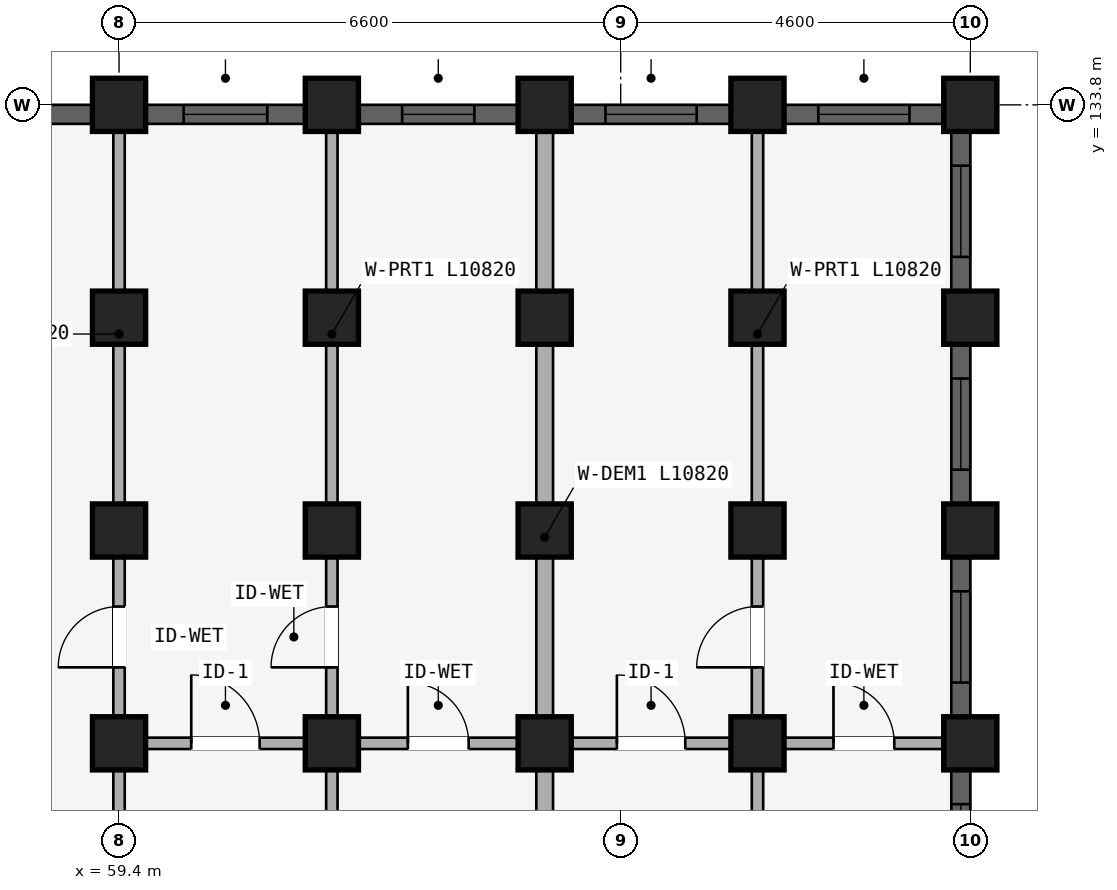
"""IFC4 building model, lengths in metres.
Left out: names, types, materials, properties, quantities, classifications, styles, units other than length and angle.
Written with IfcOpenShell. Run it as: python <this file> out.ifc"""

import sys

from ifc_helpers import new_model, si_unit, direction, frame, frame_2d, origin, origin_2d, place, context, subcontext, project, spatial, rectangle, extrude, element, fill, save


model = new_model("IFC4")
c1 = context("Model", 3, precision=1e-05, world=origin(), true_north=direction((0.0, 1.0)))
c2 = subcontext(c1, "Body", "Model", "MODEL_VIEW")
j1 = project(units=[si_unit("LENGTHUNIT", "METRE"), si_unit("PLANEANGLEUNIT", "RADIAN")], contexts=[c1])
p1 = place(None, origin())
s1 = spatial("IfcSite", under=j1, at=p1, CompositionType="ELEMENT")
p2 = place(p1, origin())
s2 = spatial("IfcBuilding", under=s1, at=p2, CompositionType="ELEMENT")
p3 = place(p2, frame((0.0, 0.0, 24.45)))
s3 = spatial("IfcBuildingStorey", under=s2, at=p3, CompositionType="ELEMENT", Elevation=24.45)
for number, where, z_axis, x_axis in (
    (1, (59.4, 125.4, 0.0), (0.0, 0.0, 1.0), (1.0, 0.0, 0.0)),
    (2, (59.4, 128.2, 0.0), (0.0, 0.0, 1.0), (1.0, 0.0, 0.0)),
    (3, (59.4, 131.0, 0.0), (0.0, 0.0, 1.0), (1.0, 0.0, 0.0)),
    (4, (59.4, 133.8, 0.0), (0.0, 0.0, 1.0), (1.0, 0.0, 0.0)),
    (5, (62.2, 125.4, 0.0), (0.0, 0.0, 1.0), (1.0, 0.0, 0.0)),
    (6, (62.2, 128.2, 0.0), (0.0, 0.0, 1.0), (1.0, 0.0, 0.0)),
    (7, (62.2, 131.0, 0.0), (0.0, 0.0, 1.0), (1.0, 0.0, 0.0)),
    (8, (62.2, 133.8, 0.0), (0.0, 0.0, 1.0), (1.0, 0.0, 0.0)),
    (9, (65.0, 125.4, 0.0), (0.0, 0.0, 1.0), (1.0, 0.0, 0.0)),
    (10, (65.0, 128.2, 0.0), (0.0, 0.0, 1.0), (1.0, 0.0, 0.0)),
    (11, (65.0, 131.0, 0.0), (0.0, 0.0, 1.0), (1.0, 0.0, 0.0)),
    (12, (65.0, 133.8, 0.0), (0.0, 0.0, 1.0), (1.0, 0.0, 0.0)),
    (13, (67.8, 125.4, 0.0), (0.0, 0.0, 1.0), (1.0, 0.0, 0.0)),
    (14, (67.8, 128.2, 0.0), (0.0, 0.0, 1.0), (1.0, 0.0, 0.0)),
    (15, (67.8, 131.0, 0.0), (0.0, 0.0, 1.0), (1.0, 0.0, 0.0)),
    (16, (67.8, 133.8, 0.0), (0.0, 0.0, 1.0), (1.0, 0.0, 0.0)),
    (17, (70.6, 125.4, 0.0), (0.0, 0.0, 1.0), (1.0, 0.0, 0.0)),
    (18, (70.6, 128.2, 0.0), (0.0, 0.0, 1.0), (1.0, 0.0, 0.0)),
    (19, (70.6, 131.0, 0.0), (0.0, 0.0, 1.0), (1.0, 0.0, 0.0)),
    (20, (70.6, 133.8, 0.0), (0.0, 0.0, 1.0), (1.0, 0.0, 0.0)),
):
    element("IfcColumn", number, at=place(p3, frame(where, z_axis=z_axis, x_axis=x_axis)), inside=s3, PredefinedType="COLUMN", context=c2, shape_type="SweptSolid", body=[
        extrude(rectangle(XDim=0.7, YDim=0.7, at=origin_2d()), origin(), (0.0, 0.0, 1.0), 2.93),
    ])
p4 = place(p3, frame((59.48, 125.4, 0.0), z_axis=(0.0, 0.0, 1.0), x_axis=(1.0, 0.0, 0.0)))
e21 = element("IfcWall", 21, at=p4, inside=s3, PredefinedType="PLUMBINGWALL", context=c2, shape_type="SweptSolid", body=[
    extrude(rectangle(XDim=2.64, YDim=0.15, at=frame_2d((1.32, 0.0))), origin(), (0.0, 0.0, 1.0), 2.372),
])
p5 = place(p4, frame((0.87, 0.0, 0.0)))
e22 = element("IfcOpeningElement", 22, at=p5, cuts=e21, PredefinedType="OPENING", context=c2, shape_type="SweptSolid", body=[
    extrude(rectangle(XDim=0.9, YDim=2.1, at=frame_2d((0.45, 1.05))), frame((0.0, 0.085, 0.0), z_axis=(0.0, -1.0, 0.0), x_axis=(1.0, 0.0, 0.0)), (0.0, 0.0, 1.0), 0.17),
])
p6 = place(p3, frame((62.28, 125.4, 0.0), z_axis=(0.0, 0.0, 1.0), x_axis=(1.0, 0.0, 0.0)))
e23 = element("IfcWall", 23, at=p6, inside=s3, PredefinedType="PLUMBINGWALL", context=c2, shape_type="SweptSolid", body=[
    extrude(rectangle(XDim=2.64, YDim=0.15, at=frame_2d((1.32, 0.0))), origin(), (0.0, 0.0, 1.0), 2.372),
])
p7 = place(p6, frame((0.92, 0.0, 0.0)))
e24 = element("IfcOpeningElement", 24, at=p7, cuts=e23, PredefinedType="OPENING", context=c2, shape_type="SweptSolid", body=[
    extrude(rectangle(XDim=0.8, YDim=2.1, at=frame_2d((0.4, 1.05))), frame((0.0, 0.085, 0.0), z_axis=(0.0, -1.0, 0.0), x_axis=(1.0, 0.0, 0.0)), (0.0, 0.0, 1.0), 0.17),
])
p8 = place(p3, frame((65.08, 125.4, 0.0), z_axis=(0.0, 0.0, 1.0), x_axis=(1.0, 0.0, 0.0)))
e25 = element("IfcWall", 25, at=p8, inside=s3, PredefinedType="PLUMBINGWALL", context=c2, shape_type="SweptSolid", body=[
    extrude(rectangle(XDim=2.64, YDim=0.15, at=frame_2d((1.32, 0.0))), origin(), (0.0, 0.0, 1.0), 2.372),
])
p9 = place(p8, frame((0.87, 0.0, 0.0)))
e26 = element("IfcOpeningElement", 26, at=p9, cuts=e25, PredefinedType="OPENING", context=c2, shape_type="SweptSolid", body=[
    extrude(rectangle(XDim=0.9, YDim=2.1, at=frame_2d((0.45, 1.05))), frame((0.0, 0.085, 0.0), z_axis=(0.0, -1.0, 0.0), x_axis=(1.0, 0.0, 0.0)), (0.0, 0.0, 1.0), 0.17),
])
p10 = place(p3, frame((67.88, 125.4, 0.0), z_axis=(0.0, 0.0, 1.0), x_axis=(1.0, 0.0, 0.0)))
e27 = element("IfcWall", 27, at=p10, inside=s3, PredefinedType="PLUMBINGWALL", context=c2, shape_type="SweptSolid", body=[
    extrude(rectangle(XDim=2.64, YDim=0.15, at=frame_2d((1.32, 0.0))), origin(), (0.0, 0.0, 1.0), 2.372),
])
p11 = place(p10, frame((0.92, 0.0, 0.0)))
e28 = element("IfcOpeningElement", 28, at=p11, cuts=e27, PredefinedType="OPENING", context=c2, shape_type="SweptSolid", body=[
    extrude(rectangle(XDim=0.8, YDim=2.1, at=frame_2d((0.4, 1.05))), frame((0.0, 0.085, 0.0), z_axis=(0.0, -1.0, 0.0), x_axis=(1.0, 0.0, 0.0)), (0.0, 0.0, 1.0), 0.17),
])
p12 = place(p3, frame((59.4, 122.7, 0.0), z_axis=(0.0, 0.0, 1.0), x_axis=(0.0, 1.0, 0.0)))
e29 = element("IfcWall", 29, at=p12, inside=s3, PredefinedType="PARTITIONING", context=c2, shape_type="SweptSolid", body=[
    extrude(rectangle(XDim=10.82, YDim=0.15, at=frame_2d((5.41, 0.0))), origin(), (0.0, 0.0, 1.0), 2.372),
])
p13 = place(p12, frame((3.7, 0.0, 0.0)))
e30 = element("IfcOpeningElement", 30, at=p13, cuts=e29, PredefinedType="OPENING", context=c2, shape_type="SweptSolid", body=[
    extrude(rectangle(XDim=0.8, YDim=2.1, at=frame_2d((0.4, 1.05))), frame((0.0, 0.085, 0.0), z_axis=(0.0, -1.0, 0.0), x_axis=(1.0, 0.0, 0.0)), (0.0, 0.0, 1.0), 0.17),
])
p14 = place(p3, frame((62.2, 122.7, 0.0), z_axis=(0.0, 0.0, 1.0), x_axis=(0.0, 1.0, 0.0)))
e31 = element("IfcWall", 31, at=p14, inside=s3, PredefinedType="PARTITIONING", context=c2, shape_type="SweptSolid", body=[
    extrude(rectangle(XDim=10.82, YDim=0.15, at=frame_2d((5.41, 0.0))), origin(), (0.0, 0.0, 1.0), 2.372),
])
p15 = place(p14, frame((3.7, 0.0, 0.0)))
e32 = element("IfcOpeningElement", 32, at=p15, cuts=e31, PredefinedType="OPENING", context=c2, shape_type="SweptSolid", body=[
    extrude(rectangle(XDim=0.8, YDim=2.1, at=frame_2d((0.4, 1.05))), frame((0.0, 0.085, 0.0), z_axis=(0.0, -1.0, 0.0), x_axis=(1.0, 0.0, 0.0)), (0.0, 0.0, 1.0), 0.17),
])
p16 = place(p3, frame((65.0, 122.7, 0.0), z_axis=(0.0, 0.0, 1.0), x_axis=(0.0, 1.0, 0.0)))
e33 = element("IfcWall", 33, at=p16, inside=s3, PredefinedType="STANDARD", context=c2, shape_type="SweptSolid", body=[
    extrude(rectangle(XDim=10.82, YDim=0.22, at=frame_2d((5.41, 0.0))), origin(), (0.0, 0.0, 1.0), 2.372),
])
p17 = place(p3, frame((67.8, 122.7, 0.0), z_axis=(0.0, 0.0, 1.0), x_axis=(0.0, 1.0, 0.0)))
e34 = element("IfcWall", 34, at=p17, inside=s3, PredefinedType="PARTITIONING", context=c2, shape_type="SweptSolid", body=[
    extrude(rectangle(XDim=10.82, YDim=0.15, at=frame_2d((5.41, 0.0))), origin(), (0.0, 0.0, 1.0), 2.372),
])
p18 = place(p17, frame((3.7, 0.0, 0.0)))
e35 = element("IfcOpeningElement", 35, at=p18, cuts=e34, PredefinedType="OPENING", context=c2, shape_type="SweptSolid", body=[
    extrude(rectangle(XDim=0.8, YDim=2.1, at=frame_2d((0.4, 1.05))), frame((0.0, 0.085, 0.0), z_axis=(0.0, -1.0, 0.0), x_axis=(1.0, 0.0, 0.0)), (0.0, 0.0, 1.0), 0.17),
])
p19 = place(p3, frame((54.154, 133.675, 0.0), z_axis=(0.0, 0.0, 1.0), x_axis=(1.0, 0.0, 0.0)))
e36 = element("IfcWall", 36, at=p19, inside=s3, PredefinedType="STANDARD", context=c2, shape_type="SweptSolid", body=[
    extrude(rectangle(XDim=4.893, YDim=0.25, at=frame_2d((2.446, 0.0))), origin(), (0.0, 0.0, 1.0), 2.472),
])
p20 = place(p19, frame((1.846, 0.0, 0.772)))
e37 = element("IfcOpeningElement", 37, at=p20, cuts=e36, PredefinedType="OPENING", context=c2, shape_type="SweptSolid", body=[
    extrude(rectangle(XDim=1.2, YDim=1.5, at=frame_2d((0.6, 0.75))), frame((0.0, 0.135, 0.0), z_axis=(0.0, -1.0, 0.0), x_axis=(1.0, 0.0, 0.0)), (0.0, 0.0, 1.0), 0.27),
])
p21 = place(p3, frame((59.753, 133.675, 0.0), z_axis=(0.0, 0.0, 1.0), x_axis=(1.0, 0.0, 0.0)))
e38 = element("IfcWall", 38, at=p21, inside=s3, PredefinedType="STANDARD", context=c2, shape_type="SweptSolid", body=[
    extrude(rectangle(XDim=2.093, YDim=0.25, at=frame_2d((1.046, 0.0))), origin(), (0.0, 0.0, 1.0), 2.472),
])
p22 = place(p21, frame((0.497, 0.0, 0.822)))
e39 = element("IfcOpeningElement", 39, at=p22, cuts=e38, PredefinedType="OPENING", context=c2, shape_type="SweptSolid", body=[
    extrude(rectangle(XDim=1.1, YDim=1.45, at=frame_2d((0.55, 0.725))), frame((0.0, 0.135, 0.0), z_axis=(0.0, -1.0, 0.0), x_axis=(1.0, 0.0, 0.0)), (0.0, 0.0, 1.0), 0.27),
])
p23 = place(p3, frame((62.553, 133.675, 0.0), z_axis=(0.0, 0.0, 1.0), x_axis=(1.0, 0.0, 0.0)))
e40 = element("IfcWall", 40, at=p23, inside=s3, PredefinedType="STANDARD", context=c2, shape_type="SweptSolid", body=[
    extrude(rectangle(XDim=2.093, YDim=0.25, at=frame_2d((1.046, 0.0))), origin(), (0.0, 0.0, 1.0), 2.472),
])
p24 = place(p23, frame((0.572, 0.0, 0.88)))
e41 = element("IfcOpeningElement", 41, at=p24, cuts=e40, PredefinedType="OPENING", context=c2, shape_type="SweptSolid", body=[
    extrude(rectangle(XDim=0.95, YDim=1.35, at=frame_2d((0.475, 0.675))), frame((0.0, 0.135, 0.0), z_axis=(0.0, -1.0, 0.0), x_axis=(1.0, 0.0, 0.0)), (0.0, 0.0, 1.0), 0.27),
])
p25 = place(p3, frame((65.354, 133.675, 0.0), z_axis=(0.0, 0.0, 1.0), x_axis=(1.0, 0.0, 0.0)))
e42 = element("IfcWall", 42, at=p25, inside=s3, PredefinedType="STANDARD", context=c2, shape_type="SweptSolid", body=[
    extrude(rectangle(XDim=2.093, YDim=0.25, at=frame_2d((1.046, 0.0))), origin(), (0.0, 0.0, 1.0), 2.472),
])
p26 = place(p25, frame((0.447, 0.0, 0.772)))
e43 = element("IfcOpeningElement", 43, at=p26, cuts=e42, PredefinedType="OPENING", context=c2, shape_type="SweptSolid", body=[
    extrude(rectangle(XDim=1.2, YDim=1.5, at=frame_2d((0.6, 0.75))), frame((0.0, 0.135, 0.0), z_axis=(0.0, -1.0, 0.0), x_axis=(1.0, 0.0, 0.0)), (0.0, 0.0, 1.0), 0.27),
])
p27 = place(p3, frame((68.154, 133.675, 0.0), z_axis=(0.0, 0.0, 1.0), x_axis=(1.0, 0.0, 0.0)))
e44 = element("IfcWall", 44, at=p27, inside=s3, PredefinedType="STANDARD", context=c2, shape_type="SweptSolid", body=[
    extrude(rectangle(XDim=2.093, YDim=0.25, at=frame_2d((1.046, 0.0))), origin(), (0.0, 0.0, 1.0), 2.472),
])
p28 = place(p27, frame((0.447, 0.0, 0.772)))
e45 = element("IfcOpeningElement", 45, at=p28, cuts=e44, PredefinedType="OPENING", context=c2, shape_type="SweptSolid", body=[
    extrude(rectangle(XDim=1.2, YDim=1.5, at=frame_2d((0.6, 0.75))), frame((0.0, 0.135, 0.0), z_axis=(0.0, -1.0, 0.0), x_axis=(1.0, 0.0, 0.0)), (0.0, 0.0, 1.0), 0.27),
])
p29 = place(p3, frame((70.475, 122.954, 0.0), z_axis=(0.0, 0.0, 1.0), x_axis=(0.0, 1.0, 0.0)))
e46 = element("IfcWall", 46, at=p29, inside=s3, PredefinedType="STANDARD", context=c2, shape_type="SweptSolid", body=[
    extrude(rectangle(XDim=2.093, YDim=0.25, at=frame_2d((1.046, 0.0))), origin(), (0.0, 0.0, 1.0), 2.372),
])
p30 = place(p29, frame((0.447, 0.0, 0.672)))
e47 = element("IfcOpeningElement", 47, at=p30, cuts=e46, PredefinedType="OPENING", context=c2, shape_type="SweptSolid", body=[
    extrude(rectangle(XDim=1.2, YDim=1.5, at=frame_2d((0.6, 0.75))), frame((0.0, 0.135, 0.0), z_axis=(0.0, -1.0, 0.0), x_axis=(1.0, 0.0, 0.0)), (0.0, 0.0, 1.0), 0.27),
])
p31 = place(p3, frame((70.475, 125.753, 0.0), z_axis=(0.0, 0.0, 1.0), x_axis=(0.0, 1.0, 0.0)))
e48 = element("IfcWall", 48, at=p31, inside=s3, PredefinedType="STANDARD", context=c2, shape_type="SweptSolid", body=[
    extrude(rectangle(XDim=2.093, YDim=0.25, at=frame_2d((1.046, 0.0))), origin(), (0.0, 0.0, 1.0), 2.372),
])
p32 = place(p31, frame((0.447, 0.0, 0.672)))
e49 = element("IfcOpeningElement", 49, at=p32, cuts=e48, PredefinedType="OPENING", context=c2, shape_type="SweptSolid", body=[
    extrude(rectangle(XDim=1.2, YDim=1.5, at=frame_2d((0.6, 0.75))), frame((0.0, 0.135, 0.0), z_axis=(0.0, -1.0, 0.0), x_axis=(1.0, 0.0, 0.0)), (0.0, 0.0, 1.0), 0.27),
])
p33 = place(p3, frame((70.475, 128.553, 0.0), z_axis=(0.0, 0.0, 1.0), x_axis=(0.0, 1.0, 0.0)))
e50 = element("IfcWall", 50, at=p33, inside=s3, PredefinedType="STANDARD", context=c2, shape_type="SweptSolid", body=[
    extrude(rectangle(XDim=2.093, YDim=0.25, at=frame_2d((1.046, 0.0))), origin(), (0.0, 0.0, 1.0), 2.372),
])
p34 = place(p33, frame((0.447, 0.0, 0.672)))
e51 = element("IfcOpeningElement", 51, at=p34, cuts=e50, PredefinedType="OPENING", context=c2, shape_type="SweptSolid", body=[
    extrude(rectangle(XDim=1.2, YDim=1.5, at=frame_2d((0.6, 0.75))), frame((0.0, 0.135, 0.0), z_axis=(0.0, -1.0, 0.0), x_axis=(1.0, 0.0, 0.0)), (0.0, 0.0, 1.0), 0.27),
])
p35 = place(p3, frame((70.475, 131.354, 0.0), z_axis=(0.0, 0.0, 1.0), x_axis=(0.0, 1.0, 0.0)))
e52 = element("IfcWall", 52, at=p35, inside=s3, PredefinedType="STANDARD", context=c2, shape_type="SweptSolid", body=[
    extrude(rectangle(XDim=2.093, YDim=0.25, at=frame_2d((1.046, 0.0))), origin(), (0.0, 0.0, 1.0), 2.372),
])
p36 = place(p35, frame((0.447, 0.0, 0.672)))
e53 = element("IfcOpeningElement", 53, at=p36, cuts=e52, PredefinedType="OPENING", context=c2, shape_type="SweptSolid", body=[
    extrude(rectangle(XDim=1.2, YDim=1.5, at=frame_2d((0.6, 0.75))), frame((0.0, 0.135, 0.0), z_axis=(0.0, -1.0, 0.0), x_axis=(1.0, 0.0, 0.0)), (0.0, 0.0, 1.0), 0.27),
])
p37 = place(p22, origin())
e54 = element("IfcWindow", 54, at=p37, inside=s3, PartitioningType="SINGLE_PANEL", PredefinedType="WINDOW", context=c2, shape_type="SweptSolid", body=[
    extrude(rectangle(XDim=1.1, YDim=1.45, at=frame_2d((0.55, 0.725))), frame((0.0, 0.03, 0.0), z_axis=(0.0, -1.0, 0.0), x_axis=(1.0, 0.0, 0.0)), (0.0, 0.0, 1.0), 0.06),
])
fill(e39, e54)
p38 = place(p24, origin())
e55 = element("IfcWindow", 55, at=p38, inside=s3, PartitioningType="SINGLE_PANEL", PredefinedType="WINDOW", context=c2, shape_type="SweptSolid", body=[
    extrude(rectangle(XDim=0.95, YDim=1.35, at=frame_2d((0.475, 0.675))), frame((0.0, 0.03, 0.0), z_axis=(0.0, -1.0, 0.0), x_axis=(1.0, 0.0, 0.0)), (0.0, 0.0, 1.0), 0.06),
])
fill(e41, e55)
p39 = place(p26, origin())
e56 = element("IfcWindow", 56, at=p39, inside=s3, PartitioningType="SINGLE_PANEL", PredefinedType="WINDOW", context=c2, shape_type="SweptSolid", body=[
    extrude(rectangle(XDim=1.2, YDim=1.5, at=frame_2d((0.6, 0.75))), frame((0.0, 0.03, 0.0), z_axis=(0.0, -1.0, 0.0), x_axis=(1.0, 0.0, 0.0)), (0.0, 0.0, 1.0), 0.06),
])
fill(e43, e56)
p40 = place(p28, origin())
e57 = element("IfcWindow", 57, at=p40, inside=s3, PartitioningType="SINGLE_PANEL", PredefinedType="WINDOW", context=c2, shape_type="SweptSolid", body=[
    extrude(rectangle(XDim=1.2, YDim=1.5, at=frame_2d((0.6, 0.75))), frame((0.0, 0.03, 0.0), z_axis=(0.0, -1.0, 0.0), x_axis=(1.0, 0.0, 0.0)), (0.0, 0.0, 1.0), 0.06),
])
fill(e45, e57)
p41 = place(p30, origin())
e58 = element("IfcWindow", 58, at=p41, inside=s3, PartitioningType="SINGLE_PANEL", PredefinedType="WINDOW", context=c2, shape_type="SweptSolid", body=[
    extrude(rectangle(XDim=1.2, YDim=1.5, at=frame_2d((0.6, 0.75))), frame((0.0, 0.03, 0.0), z_axis=(0.0, -1.0, 0.0), x_axis=(1.0, 0.0, 0.0)), (0.0, 0.0, 1.0), 0.06),
])
fill(e47, e58)
p42 = place(p32, origin())
e59 = element("IfcWindow", 59, at=p42, inside=s3, PartitioningType="SINGLE_PANEL", PredefinedType="WINDOW", context=c2, shape_type="SweptSolid", body=[
    extrude(rectangle(XDim=1.2, YDim=1.5, at=frame_2d((0.6, 0.75))), frame((0.0, 0.03, 0.0), z_axis=(0.0, -1.0, 0.0), x_axis=(1.0, 0.0, 0.0)), (0.0, 0.0, 1.0), 0.06),
])
fill(e49, e59)
p43 = place(p34, origin())
e60 = element("IfcWindow", 60, at=p43, inside=s3, PartitioningType="SINGLE_PANEL", PredefinedType="WINDOW", context=c2, shape_type="SweptSolid", body=[
    extrude(rectangle(XDim=1.2, YDim=1.5, at=frame_2d((0.6, 0.75))), frame((0.0, 0.03, 0.0), z_axis=(0.0, -1.0, 0.0), x_axis=(1.0, 0.0, 0.0)), (0.0, 0.0, 1.0), 0.06),
])
fill(e51, e60)
p44 = place(p36, origin())
e61 = element("IfcWindow", 61, at=p44, inside=s3, PartitioningType="SINGLE_PANEL", PredefinedType="WINDOW", context=c2, shape_type="SweptSolid", body=[
    extrude(rectangle(XDim=1.2, YDim=1.5, at=frame_2d((0.6, 0.75))), frame((0.0, 0.03, 0.0), z_axis=(0.0, -1.0, 0.0), x_axis=(1.0, 0.0, 0.0)), (0.0, 0.0, 1.0), 0.06),
])
fill(e53, e61)
p45 = place(p5, frame((0.9, 0.0, 0.0), z_axis=(0.0, 0.0, 1.0), x_axis=(-1.0, 0.0, 0.0)))
e62 = element("IfcDoor", 62, at=p45, inside=s3, OperationType="SINGLE_SWING_RIGHT", PredefinedType="DOOR", context=c2, shape_type="SweptSolid", body=[
    extrude(rectangle(XDim=0.9, YDim=2.1, at=frame_2d((0.45, 1.05))), frame((0.0, 0.025, 0.0), z_axis=(0.0, -1.0, 0.0), x_axis=(1.0, 0.0, 0.0)), (0.0, 0.0, 1.0), 0.05),
])
fill(e22, e62)
p46 = place(p7, frame((0.8, 0.0, 0.0), z_axis=(0.0, 0.0, 1.0), x_axis=(-1.0, 0.0, 0.0)))
e63 = element("IfcDoor", 63, at=p46, inside=s3, OperationType="SINGLE_SWING_RIGHT", PredefinedType="DOOR", context=c2, shape_type="SweptSolid", body=[
    extrude(rectangle(XDim=0.8, YDim=2.1, at=frame_2d((0.4, 1.05))), frame((0.0, 0.025, 0.0), z_axis=(0.0, -1.0, 0.0), x_axis=(1.0, 0.0, 0.0)), (0.0, 0.0, 1.0), 0.05),
])
fill(e24, e63)
p47 = place(p9, frame((0.9, 0.0, 0.0), z_axis=(0.0, 0.0, 1.0), x_axis=(-1.0, 0.0, 0.0)))
e64 = element("IfcDoor", 64, at=p47, inside=s3, OperationType="SINGLE_SWING_RIGHT", PredefinedType="DOOR", context=c2, shape_type="SweptSolid", body=[
    extrude(rectangle(XDim=0.9, YDim=2.1, at=frame_2d((0.45, 1.05))), frame((0.0, 0.025, 0.0), z_axis=(0.0, -1.0, 0.0), x_axis=(1.0, 0.0, 0.0)), (0.0, 0.0, 1.0), 0.05),
])
fill(e26, e64)
p48 = place(p11, frame((0.8, 0.0, 0.0), z_axis=(0.0, 0.0, 1.0), x_axis=(-1.0, 0.0, 0.0)))
e65 = element("IfcDoor", 65, at=p48, inside=s3, OperationType="SINGLE_SWING_RIGHT", PredefinedType="DOOR", context=c2, shape_type="SweptSolid", body=[
    extrude(rectangle(XDim=0.8, YDim=2.1, at=frame_2d((0.4, 1.05))), frame((0.0, 0.025, 0.0), z_axis=(0.0, -1.0, 0.0), x_axis=(1.0, 0.0, 0.0)), (0.0, 0.0, 1.0), 0.05),
])
fill(e28, e65)
p49 = place(p13, origin())
e66 = element("IfcDoor", 66, at=p49, inside=s3, OperationType="SINGLE_SWING_LEFT", PredefinedType="DOOR", context=c2, shape_type="SweptSolid", body=[
    extrude(rectangle(XDim=0.8, YDim=2.1, at=frame_2d((0.4, 1.05))), frame((0.0, 0.025, 0.0), z_axis=(0.0, -1.0, 0.0), x_axis=(1.0, 0.0, 0.0)), (0.0, 0.0, 1.0), 0.05),
])
fill(e30, e66)
p50 = place(p15, frame((0.8, 0.0, 0.0), z_axis=(0.0, 0.0, 1.0), x_axis=(-1.0, 0.0, 0.0)))
e67 = element("IfcDoor", 67, at=p50, inside=s3, OperationType="SINGLE_SWING_RIGHT", PredefinedType="DOOR", context=c2, shape_type="SweptSolid", body=[
    extrude(rectangle(XDim=0.8, YDim=2.1, at=frame_2d((0.4, 1.05))), frame((0.0, 0.025, 0.0), z_axis=(0.0, -1.0, 0.0), x_axis=(1.0, 0.0, 0.0)), (0.0, 0.0, 1.0), 0.05),
])
fill(e32, e67)
p51 = place(p18, origin())
e68 = element("IfcDoor", 68, at=p51, inside=s3, OperationType="SINGLE_SWING_LEFT", PredefinedType="DOOR", context=c2, shape_type="SweptSolid", body=[
    extrude(rectangle(XDim=0.8, YDim=2.1, at=frame_2d((0.4, 1.05))), frame((0.0, 0.025, 0.0), z_axis=(0.0, -1.0, 0.0), x_axis=(1.0, 0.0, 0.0)), (0.0, 0.0, 1.0), 0.05),
])
fill(e35, e68)
save(model, sys.argv[1])
